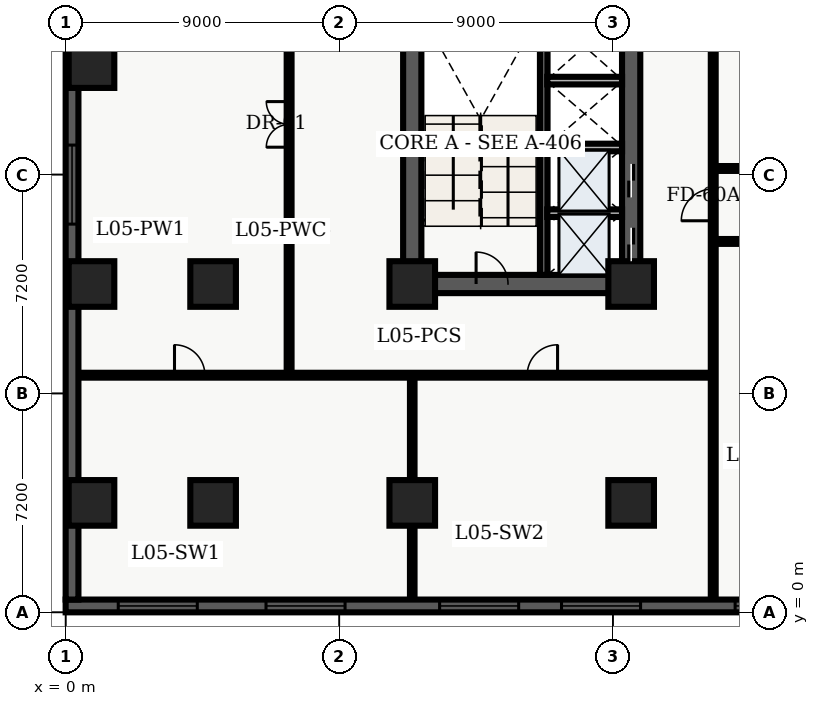
"""IFC4 building model, lengths in metres.
Left out: names, types, materials, properties, quantities, classifications, styles, units other than length and angle.
Written with IfcOpenShell. Run it as: python <this file> out.ifc"""

import sys

from ifc_helpers import new_model, entity, si_unit, converted_unit, direction, frame, origin_with_axes, origin_2d_with_axis, place, context, subcontext, project, spatial, polyline, rectangle, outline, extrude, element, fill, save


model = new_model("IFC4")
c1 = context("Model", 3, precision=1e-05, world=origin_with_axes(), true_north=direction((0.0, 1.0)))
c2 = subcontext(c1, "Body", "Model", "MODEL_VIEW")
j1 = project(units=[si_unit("LENGTHUNIT", "METRE"), converted_unit("PLANEANGLEUNIT", "DEGREE", entity("IfcPlaneAngleMeasure", 0.017), si_unit("PLANEANGLEUNIT", "RADIAN"), dimensions=[0, 0, 0, 0, 0, 0, 0])], contexts=[c1])
p1 = place(None, origin_with_axes())
s1 = spatial("IfcSite", under=j1, at=p1, CompositionType="ELEMENT")
p2 = place(p1, origin_with_axes())
s2 = spatial("IfcBuilding", under=s1, at=p2, CompositionType="ELEMENT")
p3 = place(p2, frame((0.0, 0.0, 24.3), z_axis=(0.0, 0.0, 1.0), x_axis=(1.0, 0.0, 0.0)))
s3 = spatial("IfcBuildingStorey", under=s2, at=p3, CompositionType="ELEMENT", Elevation=24.3)
p4 = place(p3, frame((11.4, 10.8, 0.0), z_axis=(0.0, 0.0, 1.0), x_axis=(0.0, 1.0, 0.0)))
e1 = element("IfcWall", 1, at=p4, inside=s3, PredefinedType="SHEAR", context=c2, shape_type="SweptSolid", body=[
    extrude(outline(polyline([(0.0, -0.3), (27.0, -0.3), (27.0, 0.3), (0.0, 0.3), (0.0, -0.3)])), origin_with_axes(), (0.0, 0.0, 1.0), 4.2),
])
p5 = place(p3, frame((11.4, 10.8, 0.0), z_axis=(0.0, 0.0, 1.0), x_axis=(1.0, 0.0, 0.0)))
e2 = element("IfcWall", 2, at=p5, inside=s3, PredefinedType="SHEAR", context=c2, shape_type="SweptSolid", body=[
    extrude(outline(polyline([(0.0, -0.3), (7.2, -0.3), (7.2, 0.3), (0.0, 0.3), (0.0, -0.3)])), origin_with_axes(), (0.0, 0.0, 1.0), 4.2),
])
p6 = place(p5, frame((2.625, 0.0, 0.0), z_axis=(0.0, 0.0, 1.0), x_axis=(1.0, 0.0, 0.0)))
e3 = element("IfcOpeningElement", 3, at=p6, cuts=e2, PredefinedType="OPENING", context=c2, shape_type="SweptSolid", body=[
    extrude(rectangle(XDim=1.05, YDim=0.62, at=origin_2d_with_axis()), origin_with_axes(), (0.0, 0.0, 1.0), 2.15),
])
p7 = place(p3, frame((18.6, 10.8, 0.0), z_axis=(0.0, 0.0, 1.0), x_axis=(0.0, 1.0, 0.0)))
e4 = element("IfcWall", 4, at=p7, inside=s3, PredefinedType="SHEAR", context=c2, shape_type="SweptSolid", body=[
    extrude(outline(polyline([(0.0, -0.3), (13.5, -0.3), (13.5, 0.3), (0.0, 0.3), (0.0, -0.3)])), origin_with_axes(), (0.0, 0.0, 1.0), 4.2),
])
p8 = place(p7, frame((1.3, 0.0, 0.0), z_axis=(0.0, 0.0, 1.0), x_axis=(1.0, 0.0, 0.0)))
e5 = element("IfcOpeningElement", 5, at=p8, cuts=e4, PredefinedType="OPENING", context=c2, shape_type="SweptSolid", body=[
    extrude(rectangle(XDim=1.1, YDim=0.62, at=origin_2d_with_axis()), origin_with_axes(), (0.0, 0.0, 1.0), 2.15),
])
p9 = place(p7, frame((3.4, 0.0, 0.0), z_axis=(0.0, 0.0, 1.0), x_axis=(1.0, 0.0, 0.0)))
e6 = element("IfcOpeningElement", 6, at=p9, cuts=e4, PredefinedType="OPENING", context=c2, shape_type="SweptSolid", body=[
    extrude(rectangle(XDim=1.1, YDim=0.62, at=origin_2d_with_axis()), origin_with_axes(), (0.0, 0.0, 1.0), 2.15),
])
p10 = place(p7, frame((11.125, 0.0, 0.0), z_axis=(0.0, 0.0, 1.0), x_axis=(1.0, 0.0, 0.0)))
e7 = element("IfcOpeningElement", 7, at=p10, cuts=e4, PredefinedType="OPENING", context=c2, shape_type="SweptSolid", body=[
    extrude(rectangle(XDim=1.05, YDim=0.62, at=origin_2d_with_axis()), origin_with_axes(), (0.0, 0.0, 1.0), 2.15),
])
p11 = place(p3, frame((15.725, 11.1, 0.0), z_axis=(0.0, 0.0, 1.0), x_axis=(0.0, 1.0, 0.0)))
e8 = element("IfcWall", 8, at=p11, inside=s3, PredefinedType="SHEAR", context=c2, shape_type="SweptSolid", body=[
    extrude(outline(polyline([(0.0, -0.125), (8.6, -0.125), (8.6, 0.125), (0.0, 0.125), (0.0, -0.125)])), origin_with_axes(), (0.0, 0.0, 1.0), 4.2),
])
for number, where, z_axis, x_axis in (
    (9, (11.4, 3.6, 0.0), (0.0, 0.0, 1.0), (1.0, 0.0, 0.0)),
    (10, (11.4, 10.8, 0.0), (0.0, 0.0, 1.0), (1.0, 0.0, 0.0)),
    (11, (18.6, 3.6, 0.0), (0.0, 0.0, 1.0), (1.0, 0.0, 0.0)),
    (12, (18.6, 10.8, 0.0), (0.0, 0.0, 1.0), (1.0, 0.0, 0.0)),
    (13, (4.85, 3.6, 0.0), (0.0, 0.0, 1.0), (1.0, 0.0, 0.0)),
    (14, (4.85, 10.8, 0.0), (0.0, 0.0, 1.0), (1.0, 0.0, 0.0)),
    (15, (0.85, 3.6, 0.0), (0.0, 0.0, 1.0), (1.0, 0.0, 0.0)),
    (16, (0.85, 10.8, 0.0), (0.0, 0.0, 1.0), (1.0, 0.0, 0.0)),
    (17, (0.85, 18.0, 0.0), (0.0, 0.0, 1.0), (1.0, 0.0, 0.0)),
):
    element("IfcColumn", number, at=place(p3, frame(where, z_axis=z_axis, x_axis=x_axis)), inside=s3, PredefinedType="COLUMN", context=c2, shape_type="SweptSolid", body=[
        extrude(rectangle(XDim=1.5, YDim=1.5, at=origin_2d_with_axis()), origin_with_axes(), (0.0, 0.0, 1.0), 4.5),
    ])
for number, where, z_axis, x_axis in (
    (18, (15.84, 13.13, 0.0), (0.0, 0.0, 1.0), (1.0, 0.0, 0.0)),
    (19, (15.84, 15.29, 0.0), (0.0, 0.0, 1.0), (1.0, 0.0, 0.0)),
    (20, (15.84, 17.49, 0.0), (0.0, 0.0, 1.0), (1.0, 0.0, 0.0)),
):
    element("IfcWall", number, at=place(p3, frame(where, z_axis=z_axis, x_axis=x_axis)), inside=s3, PredefinedType="SOLIDWALL", context=c2, shape_type="SweptSolid", body=[
        extrude(outline(polyline([(0.0, -0.125), (2.46, -0.125), (2.46, 0.125), (0.0, 0.125), (0.0, -0.125)])), origin_with_axes(), (0.0, 0.0, 1.0), 3.2),
    ])
p12 = place(p3, frame((0.38, 7.8, 0.0), z_axis=(0.0, 0.0, 1.0), x_axis=(1.0, 0.0, 0.0)))
e21 = element("IfcWall", 21, at=p12, inside=s3, PredefinedType="PARTITIONING", context=c2, shape_type="SweptSolid", body=[
    extrude(outline(polyline([(0.0, -0.08), (20.92, -0.08), (20.92, 0.08), (0.0, 0.08), (0.0, -0.08)])), origin_with_axes(), (0.0, 0.0, 1.0), 3.2),
])
p13 = place(p12, frame((3.7, 0.0, 0.0), z_axis=(0.0, 0.0, 1.0), x_axis=(1.0, 0.0, 0.0)))
e22 = element("IfcOpeningElement", 22, at=p13, cuts=e21, PredefinedType="OPENING", context=c2, shape_type="SweptSolid", body=[
    extrude(rectangle(XDim=1.0, YDim=0.18, at=origin_2d_with_axis()), origin_with_axes(), (0.0, 0.0, 1.0), 2.15),
])
p14 = place(p12, frame((15.3, 0.0, 0.0), z_axis=(0.0, 0.0, 1.0), x_axis=(1.0, 0.0, 0.0)))
e23 = element("IfcOpeningElement", 23, at=p14, cuts=e21, PredefinedType="OPENING", context=c2, shape_type="SweptSolid", body=[
    extrude(rectangle(XDim=1.0, YDim=0.18, at=origin_2d_with_axis()), origin_with_axes(), (0.0, 0.0, 1.0), 2.15),
])
p15 = place(p3, frame((11.4, 0.38, 0.0), z_axis=(0.0, 0.0, 1.0), x_axis=(0.0, 1.0, 0.0)))
e24 = element("IfcWall", 24, at=p15, inside=s3, PredefinedType="PARTITIONING", context=c2, shape_type="SweptSolid", body=[
    extrude(outline(polyline([(0.0, -0.075), (7.42, -0.075), (7.42, 0.075), (0.0, 0.075), (0.0, -0.075)])), origin_with_axes(), (0.0, 0.0, 1.0), 3.2),
])
p16 = place(p3, frame((7.35, 7.8, 0.0), z_axis=(0.0, 0.0, 1.0), x_axis=(0.0, 1.0, 0.0)))
e25 = element("IfcWall", 25, at=p16, inside=s3, PredefinedType="PARTITIONING", context=c2, shape_type="SweptSolid", body=[
    extrude(outline(polyline([(0.0, -0.08), (32.6, -0.08), (32.6, 0.08), (0.0, 0.08), (0.0, -0.08)])), origin_with_axes(), (0.0, 0.0, 1.0), 3.2),
])
p17 = place(p16, frame((8.25, 0.0, 0.0), z_axis=(0.0, 0.0, 1.0), x_axis=(1.0, 0.0, 0.0)))
e26 = element("IfcOpeningElement", 26, at=p17, cuts=e25, PredefinedType="OPENING", context=c2, shape_type="SweptSolid", body=[
    extrude(rectangle(XDim=1.5, YDim=0.18, at=origin_2d_with_axis()), origin_with_axes(), (0.0, 0.0, 1.0), 2.2),
])
p18 = place(p16, frame((21.5, 0.0, 0.0), z_axis=(0.0, 0.0, 1.0), x_axis=(1.0, 0.0, 0.0)))
e27 = element("IfcOpeningElement", 27, at=p18, cuts=e25, PredefinedType="OPENING", context=c2, shape_type="SweptSolid", body=[
    extrude(rectangle(XDim=1.0, YDim=0.18, at=origin_2d_with_axis()), origin_with_axes(), (0.0, 0.0, 1.0), 2.15),
])
p19 = place(p3, frame((21.3, 0.38, 0.0), z_axis=(0.0, 0.0, 1.0), x_axis=(0.0, 1.0, 0.0)))
e28 = element("IfcWall", 28, at=p19, inside=s3, PredefinedType="PARTITIONING", context=c2, shape_type="SweptSolid", body=[
    extrude(outline(polyline([(0.0, -0.08), (35.24, -0.08), (35.24, 0.08), (0.0, 0.08), (0.0, -0.08)])), origin_with_axes(), (0.0, 0.0, 1.0), 3.2),
])
p20 = place(p19, frame((13.025, 0.0, 0.0), z_axis=(0.0, 0.0, 1.0), x_axis=(1.0, 0.0, 0.0)))
e29 = element("IfcOpeningElement", 29, at=p20, cuts=e28, PredefinedType="OPENING", context=c2, shape_type="SweptSolid", body=[
    extrude(rectangle(XDim=1.05, YDim=0.18, at=origin_2d_with_axis()), origin_with_axes(), (0.0, 0.0, 1.0), 2.15),
])
p21 = place(p19, frame((31.25, 0.0, 0.0), z_axis=(0.0, 0.0, 1.0), x_axis=(1.0, 0.0, 0.0)))
e30 = element("IfcOpeningElement", 30, at=p21, cuts=e28, PredefinedType="OPENING", context=c2, shape_type="SweptSolid", body=[
    extrude(rectangle(XDim=1.5, YDim=0.18, at=origin_2d_with_axis()), origin_with_axes(), (0.0, 0.0, 1.0), 2.2),
])
p22 = place(p3, frame((21.3, 12.2, 0.0), z_axis=(0.0, 0.0, 1.0), x_axis=(1.0, 0.0, 0.0)))
e31 = element("IfcWall", 31, at=p22, inside=s3, PredefinedType="PARTITIONING", context=c2, shape_type="SweptSolid", body=[
    extrude(outline(polyline([(0.0, -0.08), (14.95, -0.08), (14.95, 0.08), (0.0, 0.08), (0.0, -0.08)])), origin_with_axes(), (0.0, 0.0, 1.0), 3.2),
])
p23 = place(p22, frame((8.25, 0.0, 0.0), z_axis=(0.0, 0.0, 1.0), x_axis=(1.0, 0.0, 0.0)))
e32 = element("IfcOpeningElement", 32, at=p23, cuts=e31, PredefinedType="OPENING", context=c2, shape_type="SweptSolid", body=[
    extrude(rectangle(XDim=1.5, YDim=0.18, at=origin_2d_with_axis()), origin_with_axes(), (0.0, 0.0, 1.0), 2.2),
])
p24 = place(p3, frame((21.3, 14.6, 0.0), z_axis=(0.0, 0.0, 1.0), x_axis=(1.0, 0.0, 0.0)))
e33 = element("IfcWall", 33, at=p24, inside=s3, PredefinedType="PARTITIONING", context=c2, shape_type="SweptSolid", body=[
    extrude(outline(polyline([(0.0, -0.08), (14.95, -0.08), (14.95, 0.08), (0.0, 0.08), (0.0, -0.08)])), origin_with_axes(), (0.0, 0.0, 1.0), 3.2),
])
p25 = place(p24, frame((8.25, 0.0, 0.0), z_axis=(0.0, 0.0, 1.0), x_axis=(1.0, 0.0, 0.0)))
e34 = element("IfcOpeningElement", 34, at=p25, cuts=e33, PredefinedType="OPENING", context=c2, shape_type="SweptSolid", body=[
    extrude(rectangle(XDim=1.5, YDim=0.18, at=origin_2d_with_axis()), origin_with_axes(), (0.0, 0.0, 1.0), 2.2),
])
p26 = place(p3, frame((64.38, 0.21, 0.0), z_axis=(0.0, 0.0, 1.0), x_axis=(-1.0, 0.0, 0.0)))
e35 = element("IfcWall", 35, at=p26, inside=s3, PredefinedType="SOLIDWALL", context=c2, shape_type="SweptSolid", body=[
    extrude(outline(polyline([(0.0, -0.21), (64.38, -0.21), (64.38, 0.21), (0.0, 0.21), (0.0, -0.21)])), origin_with_axes(), (0.0, 0.0, 1.0), 4.2),
])
p27 = place(p26, frame((3.03, 0.0, 0.45), z_axis=(0.0, 0.0, 1.0), x_axis=(1.0, 0.0, 0.0)))
e36 = element("IfcOpeningElement", 36, at=p27, cuts=e35, PredefinedType="OPENING", context=c2, shape_type="SweptSolid", body=[
    extrude(rectangle(XDim=2.6, YDim=0.44, at=origin_2d_with_axis()), origin_with_axes(), (0.0, 0.0, 1.0), 2.8),
])
p28 = place(p26, frame((7.89, 0.0, 0.45), z_axis=(0.0, 0.0, 1.0), x_axis=(1.0, 0.0, 0.0)))
e37 = element("IfcOpeningElement", 37, at=p28, cuts=e35, PredefinedType="OPENING", context=c2, shape_type="SweptSolid", body=[
    extrude(rectangle(XDim=2.6, YDim=0.44, at=origin_2d_with_axis()), origin_with_axes(), (0.0, 0.0, 1.0), 2.8),
])
p29 = place(p26, frame((11.9, 0.0, 0.45), z_axis=(0.0, 0.0, 1.0), x_axis=(1.0, 0.0, 0.0)))
e38 = element("IfcOpeningElement", 38, at=p29, cuts=e35, PredefinedType="OPENING", context=c2, shape_type="SweptSolid", body=[
    extrude(rectangle(XDim=2.6, YDim=0.44, at=origin_2d_with_axis()), origin_with_axes(), (0.0, 0.0, 1.0), 2.8),
])
p30 = place(p26, frame((17.61, 0.0, 0.45), z_axis=(0.0, 0.0, 1.0), x_axis=(1.0, 0.0, 0.0)))
e39 = element("IfcOpeningElement", 39, at=p30, cuts=e35, PredefinedType="OPENING", context=c2, shape_type="SweptSolid", body=[
    extrude(rectangle(XDim=2.6, YDim=0.44, at=origin_2d_with_axis()), origin_with_axes(), (0.0, 0.0, 1.0), 2.8),
])
p31 = place(p26, frame((22.47, 0.0, 0.45), z_axis=(0.0, 0.0, 1.0), x_axis=(1.0, 0.0, 0.0)))
e40 = element("IfcOpeningElement", 40, at=p31, cuts=e35, PredefinedType="OPENING", context=c2, shape_type="SweptSolid", body=[
    extrude(rectangle(XDim=2.6, YDim=0.44, at=origin_2d_with_axis()), origin_with_axes(), (0.0, 0.0, 1.0), 2.8),
])
p32 = place(p26, frame((27.33, 0.0, 0.45), z_axis=(0.0, 0.0, 1.0), x_axis=(1.0, 0.0, 0.0)))
e41 = element("IfcOpeningElement", 41, at=p32, cuts=e35, PredefinedType="OPENING", context=c2, shape_type="SweptSolid", body=[
    extrude(rectangle(XDim=2.6, YDim=0.44, at=origin_2d_with_axis()), origin_with_axes(), (0.0, 0.0, 1.0), 2.8),
])
p33 = place(p26, frame((32.19, 0.0, 0.45), z_axis=(0.0, 0.0, 1.0), x_axis=(1.0, 0.0, 0.0)))
e42 = element("IfcOpeningElement", 42, at=p33, cuts=e35, PredefinedType="OPENING", context=c2, shape_type="SweptSolid", body=[
    extrude(rectangle(XDim=2.6, YDim=0.44, at=origin_2d_with_axis()), origin_with_axes(), (0.0, 0.0, 1.0), 2.8),
])
p34 = place(p26, frame((37.05, 0.0, 0.45), z_axis=(0.0, 0.0, 1.0), x_axis=(1.0, 0.0, 0.0)))
e43 = element("IfcOpeningElement", 43, at=p34, cuts=e35, PredefinedType="OPENING", context=c2, shape_type="SweptSolid", body=[
    extrude(rectangle(XDim=2.6, YDim=0.44, at=origin_2d_with_axis()), origin_with_axes(), (0.0, 0.0, 1.0), 2.8),
])
p35 = place(p26, frame((41.06, 0.0, 0.45), z_axis=(0.0, 0.0, 1.0), x_axis=(1.0, 0.0, 0.0)))
e44 = element("IfcOpeningElement", 44, at=p35, cuts=e35, PredefinedType="OPENING", context=c2, shape_type="SweptSolid", body=[
    extrude(rectangle(XDim=2.6, YDim=0.44, at=origin_2d_with_axis()), origin_with_axes(), (0.0, 0.0, 1.0), 2.8),
])
p36 = place(p26, frame((46.77, 0.0, 0.45), z_axis=(0.0, 0.0, 1.0), x_axis=(1.0, 0.0, 0.0)))
e45 = element("IfcOpeningElement", 45, at=p36, cuts=e35, PredefinedType="OPENING", context=c2, shape_type="SweptSolid", body=[
    extrude(rectangle(XDim=2.6, YDim=0.44, at=origin_2d_with_axis()), origin_with_axes(), (0.0, 0.0, 1.0), 2.8),
])
p37 = place(p26, frame((50.78, 0.0, 0.45), z_axis=(0.0, 0.0, 1.0), x_axis=(1.0, 0.0, 0.0)))
e46 = element("IfcOpeningElement", 46, at=p37, cuts=e35, PredefinedType="OPENING", context=c2, shape_type="SweptSolid", body=[
    extrude(rectangle(XDim=2.6, YDim=0.44, at=origin_2d_with_axis()), origin_with_axes(), (0.0, 0.0, 1.0), 2.8),
])
p38 = place(p26, frame((56.49, 0.0, 0.45), z_axis=(0.0, 0.0, 1.0), x_axis=(1.0, 0.0, 0.0)))
e47 = element("IfcOpeningElement", 47, at=p38, cuts=e35, PredefinedType="OPENING", context=c2, shape_type="SweptSolid", body=[
    extrude(rectangle(XDim=2.6, YDim=0.44, at=origin_2d_with_axis()), origin_with_axes(), (0.0, 0.0, 1.0), 2.8),
])
p39 = place(p26, frame((61.35, 0.0, 0.45), z_axis=(0.0, 0.0, 1.0), x_axis=(1.0, 0.0, 0.0)))
e48 = element("IfcOpeningElement", 48, at=p39, cuts=e35, PredefinedType="OPENING", context=c2, shape_type="SweptSolid", body=[
    extrude(rectangle(XDim=2.6, YDim=0.44, at=origin_2d_with_axis()), origin_with_axes(), (0.0, 0.0, 1.0), 2.8),
])
p40 = place(p3, frame((0.21, 0.42, 0.0), z_axis=(0.0, 0.0, 1.0), x_axis=(0.0, 1.0, 0.0)))
e49 = element("IfcWall", 49, at=p40, inside=s3, PredefinedType="SOLIDWALL", context=c2, shape_type="SweptSolid", body=[
    extrude(outline(polyline([(0.0, -0.21), (48.18, -0.21), (48.18, 0.21), (0.0, 0.21), (0.0, -0.21)])), origin_with_axes(), (0.0, 0.0, 1.0), 4.2),
])
p41 = place(p40, frame((13.65, 0.0, 0.45), z_axis=(0.0, 0.0, 1.0), x_axis=(1.0, 0.0, 0.0)))
e50 = element("IfcOpeningElement", 50, at=p41, cuts=e49, PredefinedType="OPENING", context=c2, shape_type="SweptSolid", body=[
    extrude(rectangle(XDim=2.6, YDim=0.44, at=origin_2d_with_axis()), origin_with_axes(), (0.0, 0.0, 1.0), 2.8),
])
p42 = place(p40, frame((24.09, 0.0, 0.45), z_axis=(0.0, 0.0, 1.0), x_axis=(1.0, 0.0, 0.0)))
e51 = element("IfcOpeningElement", 51, at=p42, cuts=e49, PredefinedType="OPENING", context=c2, shape_type="SweptSolid", body=[
    extrude(rectangle(XDim=2.6, YDim=0.44, at=origin_2d_with_axis()), origin_with_axes(), (0.0, 0.0, 1.0), 2.8),
])
p43 = place(p40, frame((28.46, 0.0, 0.45), z_axis=(0.0, 0.0, 1.0), x_axis=(1.0, 0.0, 0.0)))
e52 = element("IfcOpeningElement", 52, at=p43, cuts=e49, PredefinedType="OPENING", context=c2, shape_type="SweptSolid", body=[
    extrude(rectangle(XDim=2.6, YDim=0.44, at=origin_2d_with_axis()), origin_with_axes(), (0.0, 0.0, 1.0), 2.8),
])
p44 = place(p40, frame((34.53, 0.0, 0.45), z_axis=(0.0, 0.0, 1.0), x_axis=(1.0, 0.0, 0.0)))
e53 = element("IfcOpeningElement", 53, at=p44, cuts=e49, PredefinedType="OPENING", context=c2, shape_type="SweptSolid", body=[
    extrude(rectangle(XDim=2.6, YDim=0.44, at=origin_2d_with_axis()), origin_with_axes(), (0.0, 0.0, 1.0), 2.8),
])
p45 = place(p7, frame((1.3, 0.0, 0.0), z_axis=(0.0, 0.0, 1.0), x_axis=(1.0, 0.0, 0.0)))
e54 = element("IfcDoor", 54, at=p45, inside=s3, OperationType="SLIDING_TO_LEFT", PredefinedType="DOOR", context=c2, shape_type="SweptSolid", body=[
    extrude(rectangle(XDim=1.1, YDim=0.09, at=origin_2d_with_axis()), origin_with_axes(), (0.0, 0.0, 1.0), 2.15),
])
fill(e5, e54)
p46 = place(p7, frame((3.4, 0.0, 0.0), z_axis=(0.0, 0.0, 1.0), x_axis=(1.0, 0.0, 0.0)))
e55 = element("IfcDoor", 55, at=p46, inside=s3, OperationType="SLIDING_TO_RIGHT", PredefinedType="DOOR", context=c2, shape_type="SweptSolid", body=[
    extrude(rectangle(XDim=1.1, YDim=0.09, at=origin_2d_with_axis()), origin_with_axes(), (0.0, 0.0, 1.0), 2.15),
])
fill(e6, e55)
p47 = place(p5, frame((2.625, 0.0, 0.0), z_axis=(0.0, 0.0, 1.0), x_axis=(1.0, 0.0, 0.0)))
e56 = element("IfcDoor", 56, at=p47, inside=s3, OperationType="SINGLE_SWING_LEFT", PredefinedType="DOOR", context=c2, shape_type="SweptSolid", body=[
    extrude(rectangle(XDim=1.05, YDim=0.09, at=origin_2d_with_axis()), origin_with_axes(), (0.0, 0.0, 1.0), 2.15),
])
fill(e3, e56)
p48 = place(p19, frame((13.025, 0.0, 0.0), z_axis=(0.0, 0.0, 1.0), x_axis=(1.0, 0.0, 0.0)))
e57 = element("IfcDoor", 57, at=p48, inside=s3, OperationType="SINGLE_SWING_LEFT", PredefinedType="DOOR", context=c2, shape_type="SweptSolid", body=[
    extrude(rectangle(XDim=1.05, YDim=0.09, at=origin_2d_with_axis()), origin_with_axes(), (0.0, 0.0, 1.0), 2.15),
])
fill(e29, e57)
p49 = place(p12, frame((3.7, 0.0, 0.0), z_axis=(0.0, 0.0, 1.0), x_axis=(1.0, 0.0, 0.0)))
e58 = element("IfcDoor", 58, at=p49, inside=s3, OperationType="SINGLE_SWING_LEFT", PredefinedType="DOOR", context=c2, shape_type="SweptSolid", body=[
    extrude(rectangle(XDim=1.0, YDim=0.09, at=origin_2d_with_axis()), origin_with_axes(), (0.0, 0.0, 1.0), 2.15),
])
fill(e22, e58)
p50 = place(p12, frame((15.3, 0.0, 0.0), z_axis=(0.0, 0.0, 1.0), x_axis=(1.0, 0.0, 0.0)))
e59 = element("IfcDoor", 59, at=p50, inside=s3, OperationType="SINGLE_SWING_RIGHT", PredefinedType="DOOR", context=c2, shape_type="SweptSolid", body=[
    extrude(rectangle(XDim=1.0, YDim=0.09, at=origin_2d_with_axis()), origin_with_axes(), (0.0, 0.0, 1.0), 2.15),
])
fill(e23, e59)
p51 = place(p16, frame((8.25, 0.0, 0.0), z_axis=(0.0, 0.0, 1.0), x_axis=(1.0, 0.0, 0.0)))
e60 = element("IfcDoor", 60, at=p51, inside=s3, OperationType="DOUBLE_DOOR_SINGLE_SWING", PredefinedType="DOOR", context=c2, shape_type="SweptSolid", body=[
    extrude(rectangle(XDim=1.5, YDim=0.09, at=origin_2d_with_axis()), origin_with_axes(), (0.0, 0.0, 1.0), 2.2),
])
fill(e26, e60)
p52 = place(p26, frame((41.06, 0.0, 0.45), z_axis=(0.0, 0.0, 1.0), x_axis=(1.0, 0.0, 0.0)))
e61 = element("IfcWindow", 61, at=p52, inside=s3, PredefinedType="WINDOW", context=c2, shape_type="SweptSolid", body=[
    extrude(rectangle(XDim=2.6, YDim=0.09, at=origin_2d_with_axis()), origin_with_axes(), (0.0, 0.0, 1.0), 2.8),
])
fill(e44, e61)
p53 = place(p26, frame((46.77, 0.0, 0.45), z_axis=(0.0, 0.0, 1.0), x_axis=(1.0, 0.0, 0.0)))
e62 = element("IfcWindow", 62, at=p53, inside=s3, PredefinedType="WINDOW", context=c2, shape_type="SweptSolid", body=[
    extrude(rectangle(XDim=2.6, YDim=0.09, at=origin_2d_with_axis()), origin_with_axes(), (0.0, 0.0, 1.0), 2.8),
])
fill(e45, e62)
p54 = place(p26, frame((50.78, 0.0, 0.45), z_axis=(0.0, 0.0, 1.0), x_axis=(1.0, 0.0, 0.0)))
e63 = element("IfcWindow", 63, at=p54, inside=s3, PredefinedType="WINDOW", context=c2, shape_type="SweptSolid", body=[
    extrude(rectangle(XDim=2.6, YDim=0.09, at=origin_2d_with_axis()), origin_with_axes(), (0.0, 0.0, 1.0), 2.8),
])
fill(e46, e63)
p55 = place(p26, frame((56.49, 0.0, 0.45), z_axis=(0.0, 0.0, 1.0), x_axis=(1.0, 0.0, 0.0)))
e64 = element("IfcWindow", 64, at=p55, inside=s3, PredefinedType="WINDOW", context=c2, shape_type="SweptSolid", body=[
    extrude(rectangle(XDim=2.6, YDim=0.09, at=origin_2d_with_axis()), origin_with_axes(), (0.0, 0.0, 1.0), 2.8),
])
fill(e47, e64)
p56 = place(p26, frame((61.35, 0.0, 0.45), z_axis=(0.0, 0.0, 1.0), x_axis=(1.0, 0.0, 0.0)))
e65 = element("IfcWindow", 65, at=p56, inside=s3, PredefinedType="WINDOW", context=c2, shape_type="SweptSolid", body=[
    extrude(rectangle(XDim=2.6, YDim=0.09, at=origin_2d_with_axis()), origin_with_axes(), (0.0, 0.0, 1.0), 2.8),
])
fill(e48, e65)
p57 = place(p40, frame((13.65, 0.0, 0.45), z_axis=(0.0, 0.0, 1.0), x_axis=(1.0, 0.0, 0.0)))
e66 = element("IfcWindow", 66, at=p57, inside=s3, PredefinedType="WINDOW", context=c2, shape_type="SweptSolid", body=[
    extrude(rectangle(XDim=2.6, YDim=0.09, at=origin_2d_with_axis()), origin_with_axes(), (0.0, 0.0, 1.0), 2.8),
])
fill(e50, e66)
save(model, sys.argv[1])
